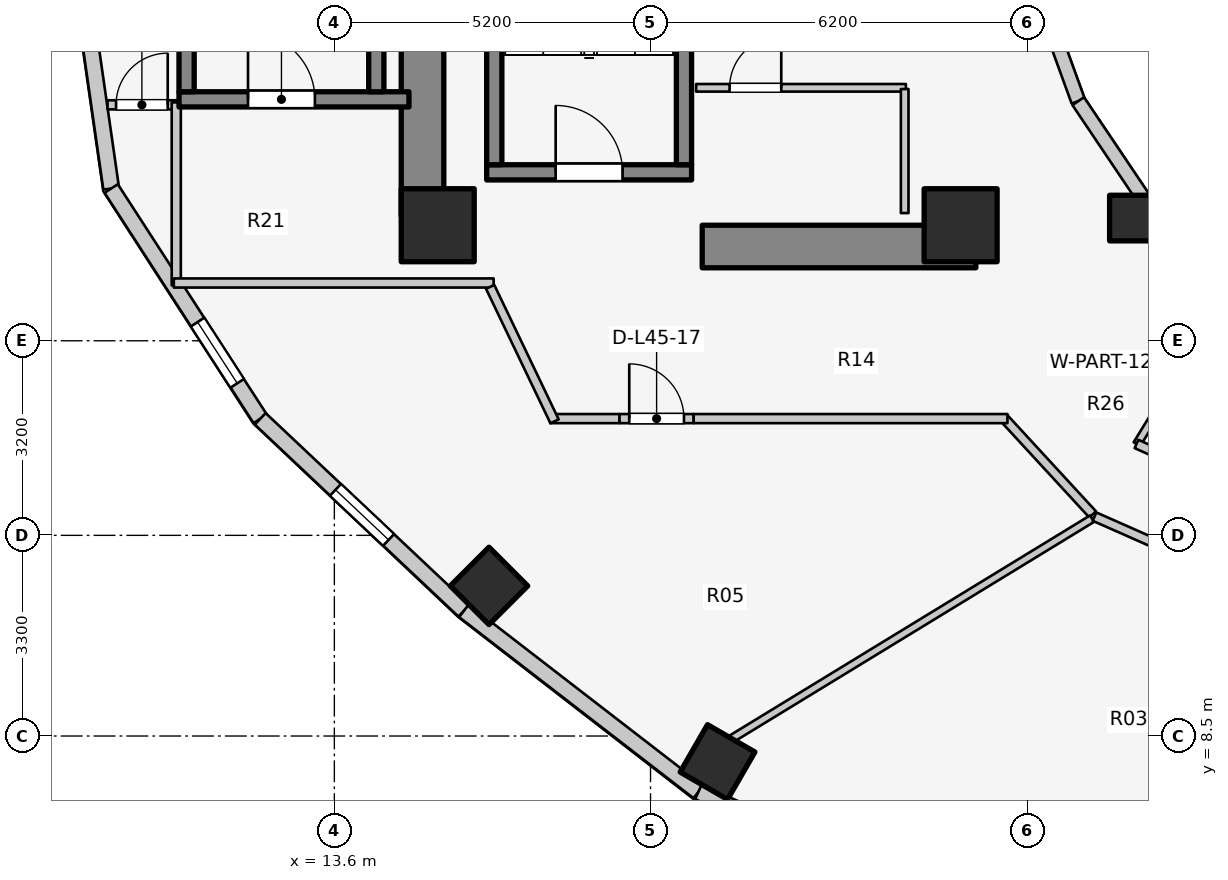
"""IFC4 building model, lengths in metres.
Left out: names, types, materials, properties, quantities, classifications, styles, units other than length and angle.
Written with IfcOpenShell. Run it as: python <this file> out.ifc"""

import sys

from ifc_helpers import new_model, si_unit, direction, frame, frame_2d, origin, origin_2d, place, context, subcontext, project, spatial, rectangle, extrude, element, fill, save


model = new_model("IFC4")
c1 = context("Model", 3, precision=1e-05, world=origin(), true_north=direction((0.0, 1.0)))
c2 = subcontext(c1, "Body", "Model", "MODEL_VIEW")
j1 = project(units=[si_unit("LENGTHUNIT", "METRE"), si_unit("PLANEANGLEUNIT", "RADIAN")], contexts=[c1])
p1 = place(None, origin())
s1 = spatial("IfcSite", under=j1, at=p1, CompositionType="ELEMENT")
p2 = place(p1, origin())
s2 = spatial("IfcBuilding", under=s1, at=p2, CompositionType="ELEMENT")
p3 = place(p2, frame((0.0, 0.0, 149.8)))
s3 = spatial("IfcBuildingStorey", under=s2, at=p3, CompositionType="ELEMENT", Elevation=149.8)
p4 = place(p3, frame((15.05, 17.05, 0.0), z_axis=(0.0, 0.0, 1.0), x_axis=(0.0, 1.0, 0.0)))
e1 = element("IfcWall", 1, at=p4, inside=s3, PredefinedType="SHEAR", context=c2, shape_type="SweptSolid", body=[
    extrude(rectangle(XDim=12.8, YDim=0.7, at=frame_2d((6.4, 0.0))), origin(), (0.0, 0.0, 1.0), 3.1),
])
p5 = place(p3, frame((19.65, 16.55, 0.0), z_axis=(0.0, 0.0, 1.0), x_axis=(1.0, 0.0, 0.0)))
e2 = element("IfcWall", 2, at=p5, inside=s3, PredefinedType="SHEAR", context=c2, shape_type="SweptSolid", body=[
    extrude(rectangle(XDim=4.5, YDim=0.7, at=frame_2d((2.25, 0.0))), origin(), (0.0, 0.0, 1.0), 3.1),
])
p6 = place(p3, frame((16.105, 17.77, 0.0), z_axis=(0.0, 0.0, 1.0), x_axis=(1.0, 0.0, 0.0)))
e3 = element("IfcWall", 3, at=p6, inside=s3, PredefinedType="SOLIDWALL", context=c2, shape_type="SweptSolid", body=[
    extrude(rectangle(XDim=3.37, YDim=0.25, at=frame_2d((1.685, 0.0))), origin(), (0.0, 0.0, 1.0), 3.1),
])
p7 = place(p6, frame((1.135, 0.0, 0.0)))
e4 = element("IfcOpeningElement", 4, at=p7, cuts=e3, PredefinedType="OPENING", context=c2, shape_type="SweptSolid", body=[
    extrude(rectangle(XDim=1.1, YDim=2.1, at=frame_2d((0.55, 1.05))), frame((0.0, 0.135, 0.0), z_axis=(0.0, -1.0, 0.0), x_axis=(1.0, 0.0, 0.0)), (0.0, 0.0, 1.0), 0.27),
])
for number, where, z_axis, x_axis in (
    (5, (16.23, 17.895, 0.0), (0.0, 0.0, 1.0), (0.0, 1.0, 0.0)),
    (6, (19.35, 17.895, 0.0), (0.0, 0.0, 1.0), (0.0, 1.0, 0.0)),
):
    element("IfcWall", number, at=place(p3, frame(where, z_axis=z_axis, x_axis=x_axis)), inside=s3, PredefinedType="SOLIDWALL", context=c2, shape_type="SweptSolid", body=[
        extrude(rectangle(XDim=7.81, YDim=0.25, at=frame_2d((3.905, 0.0))), origin(), (0.0, 0.0, 1.0), 3.1),
    ])
p8 = place(p3, frame((11.045, 18.97, 0.0), z_axis=(0.0, 0.0, 1.0), x_axis=(1.0, 0.0, 0.0)))
e7 = element("IfcWall", 7, at=p8, inside=s3, PredefinedType="SOLIDWALL", context=c2, shape_type="SweptSolid", body=[
    extrude(rectangle(XDim=3.782, YDim=0.25, at=frame_2d((1.891, 0.0))), origin(), (0.0, 0.0, 1.0), 3.1),
])
p9 = place(p8, frame((1.135, 0.0, 0.0)))
e8 = element("IfcOpeningElement", 8, at=p9, cuts=e7, PredefinedType="OPENING", context=c2, shape_type="SweptSolid", body=[
    extrude(rectangle(XDim=1.1, YDim=2.1, at=frame_2d((0.55, 1.05))), frame((0.0, 0.135, 0.0), z_axis=(0.0, -1.0, 0.0), x_axis=(1.0, 0.0, 0.0)), (0.0, 0.0, 1.0), 0.27),
])
for number, where, z_axis, x_axis in (
    (9, (11.17, 19.095, 0.0), (0.0, 0.0, 1.0), (0.0, 1.0, 0.0)),
    (10, (14.29, 19.095, 0.0), (0.0, 0.0, 1.0), (0.0, 1.0, 0.0)),
):
    element("IfcWall", number, at=place(p3, frame(where, z_axis=z_axis, x_axis=x_axis)), inside=s3, PredefinedType="SOLIDWALL", context=c2, shape_type="SweptSolid", body=[
        extrude(rectangle(XDim=7.81, YDim=0.25, at=frame_2d((3.905, 0.0))), origin(), (0.0, 0.0, 1.0), 3.1),
    ])
for number, where, z_axis, x_axis in (
    (11, (15.3, 16.9, 0.0), (0.0, 0.0, 1.0), (1.0, 0.0, 0.0)),
    (12, (23.9, 16.9, 0.0), (0.0, 0.0, 1.0), (1.0, 0.0, 0.0)),
):
    element("IfcColumn", number, at=place(p3, frame(where, z_axis=z_axis, x_axis=x_axis)), inside=s3, PredefinedType="COLUMN", context=c2, shape_type="SweptSolid", body=[
        extrude(rectangle(XDim=1.2, YDim=1.2, at=origin_2d()), origin(), (0.0, 0.0, 1.0), 3.1),
    ])
p10 = place(p3, frame((26.725, 17.018, 0.0), z_axis=(0.0, 0.0, 1.0), x_axis=(1.0, 0.0, 0.0)))
e13 = element("IfcColumn", 13, at=p10, inside=s3, PredefinedType="COLUMN", context=c2, shape_type="SweptSolid", body=[
    extrude(rectangle(XDim=0.75, YDim=0.75, at=origin_2d()), origin(), (0.0, 0.0, 1.0), 3.1),
])
for number, where, z_axis, x_axis in (
    (14, (16.143, 10.969, 0.0), (0.0, 0.0, 1.0), (-0.707, -0.707, 0.0)),
    (15, (19.902, 8.072, 0.0), (0.0, 0.0, 1.0), (-0.5, -0.866, 0.0)),
):
    element("IfcColumn", number, at=place(p3, frame(where, z_axis=z_axis, x_axis=x_axis)), inside=s3, PredefinedType="COLUMN", context=c2, shape_type="SweptSolid", body=[
        extrude(rectangle(XDim=0.9, YDim=0.9, at=origin_2d()), origin(), (0.0, 0.0, 1.0), 3.1),
    ])
p11 = place(p3, frame((25.123, 20.898, 0.0), z_axis=(0.0, 0.0, 1.0), x_axis=(0.341423187295, -0.93990968033, 0.0)))
e16 = element("IfcWall", 16, at=p11, inside=s3, PredefinedType="STANDARD", context=c2, shape_type="SweptSolid", body=[
    extrude(rectangle(XDim=2.084, YDim=0.23, at=frame_2d((1.042, 0.0))), origin(), (0.0, 0.0, 1.0), 2.56),
])
p12 = place(p3, frame((25.834, 18.94, 0.0), z_axis=(0.0, 0.0, 1.0), x_axis=(0.558197800898, -0.829707909492, 0.0)))
e17 = element("IfcWall", 17, at=p12, inside=s3, PredefinedType="STANDARD", context=c2, shape_type="SweptSolid", body=[
    extrude(rectangle(XDim=2.027, YDim=0.23, at=frame_2d((1.013, 0.0))), origin(), (0.0, 0.0, 1.0), 1.22),
])
p13 = place(p3, frame((26.965, 17.258, 0.0), z_axis=(0.0, 0.0, 1.0), x_axis=(0.752576694707, -0.658504607869, 0.0)))
e18 = element("IfcWall", 18, at=p13, inside=s3, PredefinedType="STANDARD", context=c2, shape_type="SweptSolid", body=[
    extrude(rectangle(XDim=1.959, YDim=0.23, at=frame_2d((0.98, 0.0))), origin(), (0.0, 0.0, 1.0), 1.22),
])
p14 = place(p3, frame((9.14, 23.0, 0.0), z_axis=(0.0, 0.0, 1.0), x_axis=(0.142227632286, -0.989833976288, 0.0)))
e19 = element("IfcWall", 19, at=p14, inside=s3, PredefinedType="STANDARD", context=c2, shape_type="SweptSolid", body=[
    extrude(rectangle(XDim=5.553, YDim=0.26, at=frame_2d((2.776, 0.0))), origin(), (0.0, 0.0, 1.0), 2.57),
])
p15 = place(p14, frame((1.506, 0.0, 0.75)))
e20 = element("IfcOpeningElement", 20, at=p15, cuts=e19, PredefinedType="OPENING", context=c2, shape_type="SweptSolid", body=[
    extrude(rectangle(XDim=1.2, YDim=1.5, at=frame_2d((0.6, 0.75))), frame((0.0, 0.14, 0.0), z_axis=(0.0, -1.0, 0.0), x_axis=(1.0, 0.0, 0.0)), (0.0, 0.0, 1.0), 0.28),
])
p16 = place(p3, frame((9.93, 17.503, 0.0), z_axis=(0.0, 0.0, 1.0), x_axis=(0.543358984534, -0.839500454989, 0.0)))
e21 = element("IfcWall", 21, at=p16, inside=s3, PredefinedType="STANDARD", context=c2, shape_type="SweptSolid", body=[
    extrude(rectangle(XDim=4.511, YDim=0.26, at=frame_2d((2.256, 0.0))), origin(), (0.0, 0.0, 1.0), 1.22),
])
p17 = place(p16, frame((2.615, 0.0, 0.15)))
e22 = element("IfcOpeningElement", 22, at=p17, cuts=e21, PredefinedType="OPENING", context=c2, shape_type="SweptSolid", body=[
    extrude(rectangle(XDim=1.2, YDim=0.9, at=frame_2d((0.6, 0.45))), frame((0.0, 0.14, 0.0), z_axis=(0.0, -1.0, 0.0), x_axis=(1.0, 0.0, 0.0)), (0.0, 0.0, 1.0), 0.28),
])
p18 = place(p3, frame((12.381, 13.716, 0.0), z_axis=(0.0, 0.0, 1.0), x_axis=(0.727667301037, -0.68593024354, 0.0)))
e23 = element("IfcWall", 23, at=p18, inside=s3, PredefinedType="STANDARD", context=c2, shape_type="SweptSolid", body=[
    extrude(rectangle(XDim=4.604, YDim=0.26, at=frame_2d((2.302, 0.0))), origin(), (0.0, 0.0, 1.0), 1.22),
])
p19 = place(p18, frame((1.702, 0.0, 0.15)))
e24 = element("IfcOpeningElement", 24, at=p19, cuts=e23, PredefinedType="OPENING", context=c2, shape_type="SweptSolid", body=[
    extrude(rectangle(XDim=1.2, YDim=0.9, at=frame_2d((0.6, 0.45))), frame((0.0, 0.14, 0.0), z_axis=(0.0, -1.0, 0.0), x_axis=(1.0, 0.0, 0.0)), (0.0, 0.0, 1.0), 0.28),
])
p20 = place(p3, frame((15.731, 10.559, 0.0), z_axis=(0.0, 0.0, 1.0), x_axis=(0.791460185804, -0.611220724687, 0.0)))
e25 = element("IfcWall", 25, at=p20, inside=s3, PredefinedType="STANDARD", context=c2, shape_type="SweptSolid", body=[
    extrude(rectangle(XDim=4.872, YDim=0.26, at=frame_2d((2.436, 0.0))), origin(), (0.0, 0.0, 1.0), 1.22),
])
p21 = place(p3, frame((19.587, 7.581, 0.0), z_axis=(0.0, 0.0, 1.0), x_axis=(0.912353637112, -0.409403029847, 0.0)))
e26 = element("IfcWall", 26, at=p21, inside=s3, PredefinedType="STANDARD", context=c2, shape_type="SweptSolid", body=[
    extrude(rectangle(XDim=5.533, YDim=0.26, at=frame_2d((2.766, 0.0))), origin(), (0.0, 0.0, 1.0), 1.22),
])
p22 = place(p21, frame((2.167, 0.0, 0.15)))
e27 = element("IfcOpeningElement", 27, at=p22, cuts=e26, PredefinedType="OPENING", context=c2, shape_type="SweptSolid", body=[
    extrude(rectangle(XDim=1.2, YDim=0.9, at=frame_2d((0.6, 0.45))), frame((0.0, 0.14, 0.0), z_axis=(0.0, -1.0, 0.0), x_axis=(1.0, 0.0, 0.0)), (0.0, 0.0, 1.0), 0.28),
])
p23 = place(p3, frame((19.55, 19.16, 0.0), z_axis=(0.0, 0.0, 1.0), x_axis=(1.0, 0.0, 0.0)))
e28 = element("IfcWall", 28, at=p23, inside=s3, PredefinedType="PARTITIONING", context=c2, shape_type="SweptSolid", body=[
    extrude(rectangle(XDim=3.45, YDim=0.125, at=frame_2d((1.725, 0.0))), origin(), (0.0, 0.0, 1.0), 2.12),
])
p24 = place(p23, frame((0.55, 0.0, 0.0)))
e29 = element("IfcOpeningElement", 29, at=p24, cuts=e28, PredefinedType="OPENING", context=c2, shape_type="SweptSolid", body=[
    extrude(rectangle(XDim=0.85, YDim=2.05, at=frame_2d((0.425, 1.025))), frame((0.0, 0.073, 0.0), z_axis=(0.0, -1.0, 0.0), x_axis=(1.0, 0.0, 0.0)), (0.0, 0.0, 1.0), 0.145),
])
p25 = place(p3, frame((22.98, 17.1, 0.0), z_axis=(0.0, 0.0, 1.0), x_axis=(0.0, 1.0, 0.0)))
e30 = element("IfcWall", 30, at=p25, inside=s3, PredefinedType="PARTITIONING", context=c2, shape_type="SweptSolid", body=[
    extrude(rectangle(XDim=2.04, YDim=0.125, at=frame_2d((1.02, 0.0))), origin(), (0.0, 0.0, 1.0), 2.575),
])
p26 = place(p3, frame((9.87, 18.88, 0.0), z_axis=(0.0, 0.0, 1.0), x_axis=(1.0, 0.0, 0.0)))
e31 = element("IfcWall", 31, at=p26, inside=s3, PredefinedType="PARTITIONING", context=c2, shape_type="SweptSolid", body=[
    extrude(rectangle(XDim=1.17, YDim=0.15, at=frame_2d((0.585, 0.0))), origin(), (0.0, 0.0, 1.0), 2.575),
])
p27 = place(p26, frame((0.14, 0.0, 0.0)))
e32 = element("IfcOpeningElement", 32, at=p27, cuts=e31, PredefinedType="OPENING", context=c2, shape_type="SweptSolid", body=[
    extrude(rectangle(XDim=0.85, YDim=2.05, at=frame_2d((0.425, 1.025))), frame((0.0, 0.085, 0.0), z_axis=(0.0, -1.0, 0.0), x_axis=(1.0, 0.0, 0.0)), (0.0, 0.0, 1.0), 0.17),
])
p28 = place(p3, frame((11.0, 15.91, 0.0), z_axis=(0.0, 0.0, 1.0), x_axis=(0.0, 1.0, 0.0)))
e33 = element("IfcWall", 33, at=p28, inside=s3, PredefinedType="PARTITIONING", context=c2, shape_type="SweptSolid", body=[
    extrude(rectangle(XDim=3.01, YDim=0.15, at=frame_2d((1.505, 0.0))), origin(), (0.0, 0.0, 1.0), 2.575),
])
p29 = place(p3, frame((10.96, 15.95, 0.0), z_axis=(0.0, 0.0, 1.0), x_axis=(1.0, 0.0, 0.0)))
e34 = element("IfcWall", 34, at=p29, inside=s3, PredefinedType="PARTITIONING", context=c2, shape_type="SweptSolid", body=[
    extrude(rectangle(XDim=5.26, YDim=0.15, at=frame_2d((2.63, 0.0))), origin(), (0.0, 0.0, 1.0), 1.22),
])
p30 = place(p3, frame((26.072, 12.144, 0.0), z_axis=(0.0, 0.0, 1.0), x_axis=(-0.677579737957, 0.735449317567, 0.0)))
e35 = element("IfcWall", 35, at=p30, inside=s3, PredefinedType="PARTITIONING", context=c2, shape_type="SweptSolid", body=[
    extrude(rectangle(XDim=2.173, YDim=0.15, at=frame_2d((1.086, 0.0))), origin(), (0.0, 0.0, 1.0), 1.22),
])
p31 = place(p3, frame((17.15, 13.72, 0.0), z_axis=(0.0, 0.0, 1.0), x_axis=(1.0, 0.0, 0.0)))
e36 = element("IfcWall", 36, at=p31, inside=s3, PredefinedType="PARTITIONING", context=c2, shape_type="SweptSolid", body=[
    extrude(rectangle(XDim=1.14, YDim=0.15, at=frame_2d((0.57, 0.0))), origin(), (0.0, 0.0, 1.0), 2.575),
])
p32 = place(p3, frame((18.29, 13.72, 0.0), z_axis=(0.0, 0.0, 1.0), x_axis=(1.0, 0.0, 0.0)))
e37 = element("IfcWall", 37, at=p32, inside=s3, PredefinedType="PARTITIONING", context=c2, shape_type="SweptSolid", body=[
    extrude(rectangle(XDim=1.22, YDim=0.15, at=frame_2d((0.61, 0.0))), origin(), (0.0, 0.0, 1.0), 2.575),
])
p33 = place(p32, frame((0.16, 0.0, 0.0)))
e38 = element("IfcOpeningElement", 38, at=p33, cuts=e37, PredefinedType="OPENING", context=c2, shape_type="SweptSolid", body=[
    extrude(rectangle(XDim=0.9, YDim=2.1, at=frame_2d((0.45, 1.05))), frame((0.0, 0.085, 0.0), z_axis=(0.0, -1.0, 0.0), x_axis=(1.0, 0.0, 0.0)), (0.0, 0.0, 1.0), 0.17),
])
p34 = place(p3, frame((19.51, 13.72, 0.0), z_axis=(0.0, 0.0, 1.0), x_axis=(1.0, 0.0, 0.0)))
e39 = element("IfcWall", 39, at=p34, inside=s3, PredefinedType="PARTITIONING", context=c2, shape_type="SweptSolid", body=[
    extrude(rectangle(XDim=5.16, YDim=0.15, at=frame_2d((2.58, 0.0))), origin(), (0.0, 0.0, 1.0), 1.22),
])
p35 = place(p3, frame((17.222, 13.675, 0.0), z_axis=(0.0, 0.0, 1.0), x_axis=(-0.431973389813, 0.901886351207, 0.0)))
e40 = element("IfcWall", 40, at=p35, inside=s3, PredefinedType="PARTITIONING", context=c2, shape_type="SweptSolid", body=[
    extrude(rectangle(XDim=2.452, YDim=0.15, at=frame_2d((1.226, 0.0))), origin(), (0.0, 0.0, 1.0), 2.575),
])
p36 = place(p3, frame((28.45, 15.985, 0.0), z_axis=(0.0, 0.0, 1.0), x_axis=(-0.523587550846, -0.851971875474, 0.0)))
e41 = element("IfcWall", 41, at=p36, inside=s3, PredefinedType="PARTITIONING", context=c2, shape_type="SweptSolid", body=[
    extrude(rectangle(XDim=3.153, YDim=0.125, at=frame_2d((1.577, 0.0))), origin(), (0.0, 0.0, 1.0), 1.22),
])
p37 = place(p3, frame((26.793, 13.303, 0.0), z_axis=(0.0, 0.0, 1.0), x_axis=(0.913145536541, -0.407633694749, 0.0)))
e42 = element("IfcWall", 42, at=p37, inside=s3, PredefinedType="PARTITIONING", context=c2, shape_type="SweptSolid", body=[
    extrude(rectangle(XDim=2.756, YDim=0.15, at=frame_2d((1.378, 0.0))), origin(), (0.0, 0.0, 1.0), 1.22),
])
p38 = place(p3, frame((26.062, 12.075, 0.0), z_axis=(0.0, 0.0, 1.0), x_axis=(-0.853440334679, -0.521190555501, 0.0)))
e43 = element("IfcWall", 43, at=p38, inside=s3, PredefinedType="PARTITIONING", context=c2, shape_type="SweptSolid", body=[
    extrude(rectangle(XDim=6.966, YDim=0.125, at=frame_2d((3.483, 0.0))), origin(), (0.0, 0.0, 1.0), 1.22),
])
p39 = place(p3, frame((26.102, 12.108, 0.0), z_axis=(0.0, 0.0, 1.0), x_axis=(0.914519212393, -0.40454247016, 0.0)))
e44 = element("IfcWall", 44, at=p39, inside=s3, PredefinedType="PARTITIONING", context=c2, shape_type="SweptSolid", body=[
    extrude(rectangle(XDim=3.124, YDim=0.15, at=frame_2d((1.562, 0.0))), origin(), (0.0, 0.0, 1.0), 1.22),
])
p40 = place(p17, origin())
e45 = element("IfcWindow", 45, at=p40, inside=s3, PartitioningType="SINGLE_PANEL", PredefinedType="WINDOW", context=c2, shape_type="SweptSolid", body=[
    extrude(rectangle(XDim=1.2, YDim=0.9, at=frame_2d((0.6, 0.45))), frame((0.0, 0.03, 0.0), z_axis=(0.0, -1.0, 0.0), x_axis=(1.0, 0.0, 0.0)), (0.0, 0.0, 1.0), 0.06),
])
fill(e22, e45)
p41 = place(p19, origin())
e46 = element("IfcWindow", 46, at=p41, inside=s3, PartitioningType="SINGLE_PANEL", PredefinedType="WINDOW", context=c2, shape_type="SweptSolid", body=[
    extrude(rectangle(XDim=1.2, YDim=0.9, at=frame_2d((0.6, 0.45))), frame((0.0, 0.03, 0.0), z_axis=(0.0, -1.0, 0.0), x_axis=(1.0, 0.0, 0.0)), (0.0, 0.0, 1.0), 0.06),
])
fill(e24, e46)
p42 = place(p7, origin())
e47 = element("IfcDoor", 47, at=p42, inside=s3, OperationType="SINGLE_SWING_LEFT", PredefinedType="DOOR", context=c2, shape_type="SweptSolid", body=[
    extrude(rectangle(XDim=1.1, YDim=2.1, at=frame_2d((0.55, 1.05))), frame((0.0, 0.025, 0.0), z_axis=(0.0, -1.0, 0.0), x_axis=(1.0, 0.0, 0.0)), (0.0, 0.0, 1.0), 0.05),
])
fill(e4, e47)
p43 = place(p9, origin())
e48 = element("IfcDoor", 48, at=p43, inside=s3, OperationType="SINGLE_SWING_LEFT", PredefinedType="DOOR", context=c2, shape_type="SweptSolid", body=[
    extrude(rectangle(XDim=1.1, YDim=2.1, at=frame_2d((0.55, 1.05))), frame((0.0, 0.025, 0.0), z_axis=(0.0, -1.0, 0.0), x_axis=(1.0, 0.0, 0.0)), (0.0, 0.0, 1.0), 0.05),
])
fill(e8, e48)
p44 = place(p24, origin())
e49 = element("IfcDoor", 49, at=p44, inside=s3, OperationType="SINGLE_SWING_RIGHT", PredefinedType="DOOR", context=c2, shape_type="SweptSolid", body=[
    extrude(rectangle(XDim=0.85, YDim=2.05, at=frame_2d((0.425, 1.025))), frame((0.0, 0.025, 0.0), z_axis=(0.0, -1.0, 0.0), x_axis=(1.0, 0.0, 0.0)), (0.0, 0.0, 1.0), 0.05),
])
fill(e29, e49)
p45 = place(p27, origin())
e50 = element("IfcDoor", 50, at=p45, inside=s3, OperationType="SINGLE_SWING_RIGHT", PredefinedType="DOOR", context=c2, shape_type="SweptSolid", body=[
    extrude(rectangle(XDim=0.85, YDim=2.05, at=frame_2d((0.425, 1.025))), frame((0.0, 0.025, 0.0), z_axis=(0.0, -1.0, 0.0), x_axis=(1.0, 0.0, 0.0)), (0.0, 0.0, 1.0), 0.05),
])
fill(e32, e50)
p46 = place(p33, origin())
e51 = element("IfcDoor", 51, at=p46, inside=s3, OperationType="SINGLE_SWING_LEFT", PredefinedType="DOOR", context=c2, shape_type="SweptSolid", body=[
    extrude(rectangle(XDim=0.9, YDim=2.1, at=frame_2d((0.45, 1.05))), frame((0.0, 0.025, 0.0), z_axis=(0.0, -1.0, 0.0), x_axis=(1.0, 0.0, 0.0)), (0.0, 0.0, 1.0), 0.05),
])
fill(e38, e51)
save(model, sys.argv[1])
